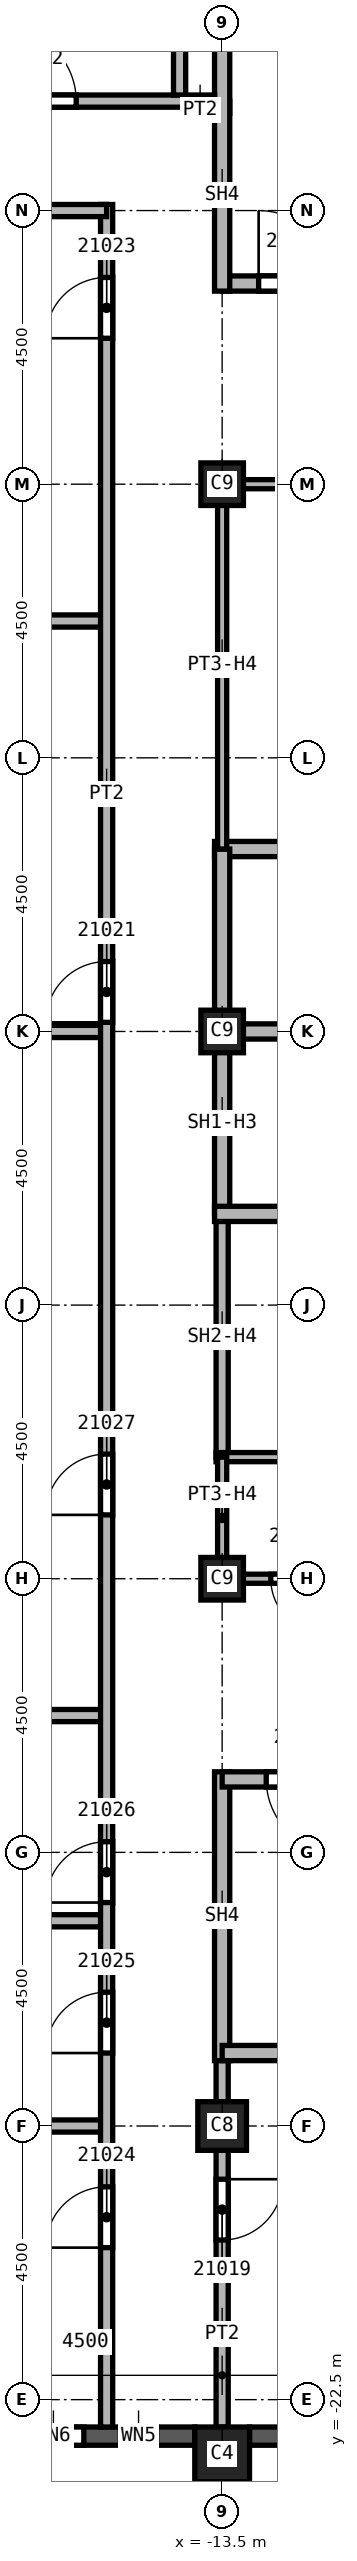
"""IFC4 building model, lengths in metres.
Left out: names, types, materials, properties, quantities, classifications, styles, units other than length and angle.
Written with IfcOpenShell. Run it as: python <this file> out.ifc"""

import sys

from ifc_helpers import new_model, si_unit, direction, frame, frame_2d, origin, origin_2d, place, context, subcontext, project, spatial, rectangle, extrude, element, fill, save


model = new_model("IFC4")
c1 = context("Model", 3, precision=1e-05, world=origin(), true_north=direction((0.0, 1.0)))
c2 = subcontext(c1, "Body", "Model", "MODEL_VIEW")
j1 = project(units=[si_unit("LENGTHUNIT", "METRE"), si_unit("PLANEANGLEUNIT", "RADIAN")], contexts=[c1])
p1 = place(None, origin())
s1 = spatial("IfcSite", under=j1, at=p1, CompositionType="ELEMENT")
p2 = place(p1, origin())
s2 = spatial("IfcBuilding", under=s1, at=p2, CompositionType="ELEMENT")
p3 = place(p2, frame((0.0, 0.0, 304.0)))
s3 = spatial("IfcBuildingStorey", under=s2, at=p3, CompositionType="ELEMENT", Elevation=304.0)
p4 = place(p3, frame((-13.5, -18.0, 0.0), z_axis=(0.0, 0.0, 1.0), x_axis=(1.0, 0.0, 0.0)))
e1 = element("IfcColumn", 1, at=p4, inside=s3, PredefinedType="COLUMN", context=c2, shape_type="SweptSolid", body=[
    extrude(rectangle(XDim=0.8, YDim=0.8, at=origin_2d()), origin(), (0.0, 0.0, 1.0), 3.74),
])
for number, where, z_axis, x_axis in (
    (2, (-13.5, 0.0, 0.0), (0.0, 0.0, 1.0), (1.0, 0.0, 0.0)),
    (3, (-13.5, 9.0, 0.0), (0.0, 0.0, 1.0), (1.0, 0.0, 0.0)),
    (4, (-13.5, -9.0, 0.0), (0.0, 0.0, 1.0), (1.0, 0.0, 0.0)),
):
    element("IfcColumn", number, at=place(p3, frame(where, z_axis=z_axis, x_axis=x_axis)), inside=s3, PredefinedType="COLUMN", context=c2, shape_type="SweptSolid", body=[
        extrude(rectangle(XDim=0.7, YDim=0.7, at=origin_2d()), origin(), (0.0, 0.0, 1.0), 3.74),
    ])
p5 = place(p3, frame((-13.5, -23.4, 0.0), z_axis=(0.0, 0.0, 1.0), x_axis=(1.0, 0.0, 0.0)))
e5 = element("IfcColumn", 5, at=p5, inside=s3, PredefinedType="COLUMN", context=c2, shape_type="SweptSolid", body=[
    extrude(rectangle(XDim=0.9, YDim=0.9, at=origin_2d()), origin(), (0.0, 0.0, 1.0), 3.74),
])
p6 = place(p3, frame((-17.55, -23.1, 0.0), z_axis=(0.0, 0.0, 1.0), x_axis=(1.0, 0.0, 0.0)))
e6 = element("IfcWall", 6, at=p6, inside=s3, PredefinedType="SOLIDWALL", context=c2, shape_type="SweptSolid", body=[
    extrude(rectangle(XDim=3.6, YDim=0.3, at=frame_2d((1.8, 0.0))), origin(), (0.0, 0.0, 1.0), 3.14),
])
p7 = place(p6, frame((0.775, 0.0, 0.8)))
e7 = element("IfcOpeningElement", 7, at=p7, cuts=e6, PredefinedType="OPENING", context=c2, shape_type="SweptSolid", body=[
    extrude(rectangle(XDim=1.0, YDim=1.95, at=frame_2d((0.5, 0.975))), frame((0.0, 0.15, 0.0), z_axis=(0.0, -1.0, 0.0), x_axis=(1.0, 0.0, 0.0)), (0.0, 0.0, 1.0), 0.3),
])
p8 = place(p6, frame((2.375, 0.0, 0.8)))
e8 = element("IfcOpeningElement", 8, at=p8, cuts=e6, PredefinedType="OPENING", context=c2, shape_type="SweptSolid", body=[
    extrude(rectangle(XDim=0.6, YDim=1.95, at=frame_2d((0.3, 0.975))), frame((0.0, 0.15, 0.0), z_axis=(0.0, -1.0, 0.0), x_axis=(1.0, 0.0, 0.0)), (0.0, 0.0, 1.0), 0.3),
])
p9 = place(p3, frame((-13.05, -23.1, 0.0), z_axis=(0.0, 0.0, 1.0), x_axis=(1.0, 0.0, 0.0)))
e9 = element("IfcWall", 9, at=p9, inside=s3, PredefinedType="SOLIDWALL", context=c2, shape_type="SweptSolid", body=[
    extrude(rectangle(XDim=3.6, YDim=0.3, at=frame_2d((1.8, 0.0))), origin(), (0.0, 0.0, 1.0), 3.14),
])
p10 = place(p9, frame((0.6, 0.0, 0.8)))
e10 = element("IfcOpeningElement", 10, at=p10, cuts=e9, PredefinedType="OPENING", context=c2, shape_type="SweptSolid", body=[
    extrude(rectangle(XDim=2.4, YDim=1.95, at=frame_2d((1.2, 0.975))), frame((0.0, 0.15, 0.0), z_axis=(0.0, -1.0, 0.0), x_axis=(1.0, 0.0, 0.0)), (0.0, 0.0, 1.0), 0.3),
])
for number, where, z_axis, x_axis in (
    (11, (-26.55, -14.625, 0.0), (0.0, 0.0, 1.0), (1.0, 0.0, 0.0)),
    (12, (-26.55, -11.25, 0.0), (0.0, 0.0, 1.0), (1.0, 0.0, 0.0)),
    (13, (-26.55, 6.75, 0.0), (0.0, 0.0, 1.0), (1.0, 0.0, 0.0)),
):
    element("IfcWall", number, at=place(p3, frame(where, z_axis=z_axis, x_axis=x_axis)), inside=s3, PredefinedType="PARTITIONING", context=c2, shape_type="SweptSolid", body=[
        extrude(rectangle(XDim=11.15, YDim=0.2, at=frame_2d((5.575, 0.0))), origin(), (0.0, 0.0, 1.0), 3.74),
    ])
p11 = place(p3, frame((-24.3, -18.0, 0.0), z_axis=(0.0, 0.0, 1.0), x_axis=(1.0, 0.0, 0.0)))
e14 = element("IfcWall", 14, at=p11, inside=s3, PredefinedType="PARTITIONING", context=c2, shape_type="SweptSolid", body=[
    extrude(rectangle(XDim=8.9, YDim=0.2, at=frame_2d((4.45, 0.0))), origin(), (0.0, 0.0, 1.0), 3.74),
])
p12 = place(p3, frame((-15.4, 0.0, 0.0), z_axis=(0.0, 0.0, 1.0), x_axis=(-1.0, 0.0, 0.0)))
e15 = element("IfcWall", 15, at=p12, inside=s3, PredefinedType="PARTITIONING", context=c2, shape_type="SweptSolid", body=[
    extrude(rectangle(XDim=11.15, YDim=0.2, at=frame_2d((5.575, 0.0))), origin(), (0.0, 0.0, 1.0), 3.74),
])
p13 = place(p3, frame((-15.4, -22.95, 0.0), z_axis=(0.0, 0.0, 1.0), x_axis=(0.0, 1.0, 0.0)))
e16 = element("IfcWall", 16, at=p13, inside=s3, PredefinedType="PARTITIONING", context=c2, shape_type="SweptSolid", body=[
    extrude(rectangle(XDim=36.55, YDim=0.2, at=frame_2d((18.275, 0.0))), origin(), (0.0, 0.0, 1.0), 3.74),
])
p14 = place(p13, frame((23.1, 0.0, 0.0)))
e17 = element("IfcOpeningElement", 17, at=p14, cuts=e16, PredefinedType="OPENING", context=c2, shape_type="SweptSolid", body=[
    extrude(rectangle(XDim=1.0, YDim=2.1, at=frame_2d((0.5, 1.05))), frame((0.0, 0.1, 0.0), z_axis=(0.0, -1.0, 0.0), x_axis=(1.0, 0.0, 0.0)), (0.0, 0.0, 1.0), 0.2),
])
p15 = place(p13, frame((34.35, 0.0, 0.0)))
e18 = element("IfcOpeningElement", 18, at=p15, cuts=e16, PredefinedType="OPENING", context=c2, shape_type="SweptSolid", body=[
    extrude(rectangle(XDim=1.0, YDim=2.1, at=frame_2d((0.5, 1.05))), frame((0.0, 0.1, 0.0), z_axis=(0.0, -1.0, 0.0), x_axis=(1.0, 0.0, 0.0)), (0.0, 0.0, 1.0), 0.2),
])
p16 = place(p13, frame((2.95, 0.0, 0.0)))
e19 = element("IfcOpeningElement", 19, at=p16, cuts=e16, PredefinedType="OPENING", context=c2, shape_type="SweptSolid", body=[
    extrude(rectangle(XDim=1.0, YDim=2.1, at=frame_2d((0.5, 1.05))), frame((0.0, 0.1, 0.0), z_axis=(0.0, -1.0, 0.0), x_axis=(1.0, 0.0, 0.0)), (0.0, 0.0, 1.0), 0.2),
])
p17 = place(p13, frame((6.15, 0.0, 0.0)))
e20 = element("IfcOpeningElement", 20, at=p17, cuts=e16, PredefinedType="OPENING", context=c2, shape_type="SweptSolid", body=[
    extrude(rectangle(XDim=1.0, YDim=2.1, at=frame_2d((0.5, 1.05))), frame((0.0, 0.1, 0.0), z_axis=(0.0, -1.0, 0.0), x_axis=(1.0, 0.0, 0.0)), (0.0, 0.0, 1.0), 0.2),
])
p18 = place(p13, frame((8.625, 0.0, 0.0)))
e21 = element("IfcOpeningElement", 21, at=p18, cuts=e16, PredefinedType="OPENING", context=c2, shape_type="SweptSolid", body=[
    extrude(rectangle(XDim=1.0, YDim=2.1, at=frame_2d((0.5, 1.05))), frame((0.0, 0.1, 0.0), z_axis=(0.0, -1.0, 0.0), x_axis=(1.0, 0.0, 0.0)), (0.0, 0.0, 1.0), 0.2),
])
p19 = place(p13, frame((15.0, 0.0, 0.0)))
e22 = element("IfcOpeningElement", 22, at=p19, cuts=e16, PredefinedType="OPENING", context=c2, shape_type="SweptSolid", body=[
    extrude(rectangle(XDim=1.0, YDim=2.1, at=frame_2d((0.5, 1.05))), frame((0.0, 0.1, 0.0), z_axis=(0.0, -1.0, 0.0), x_axis=(1.0, 0.0, 0.0)), (0.0, 0.0, 1.0), 0.2),
])
p20 = place(p3, frame((-15.4, 13.5, 0.0), z_axis=(0.0, 0.0, 1.0), x_axis=(-1.0, 0.0, 0.0)))
e23 = element("IfcWall", 23, at=p20, inside=s3, PredefinedType="PARTITIONING", context=c2, shape_type="SweptSolid", body=[
    extrude(rectangle(XDim=6.6, YDim=0.2, at=frame_2d((3.3, 0.0))), origin(), (0.0, 0.0, 1.0), 3.74),
])
p21 = place(p3, frame((-14.1, 15.2, 0.0), z_axis=(0.0, 0.0, 1.0), x_axis=(1.0, 0.0, 0.0)))
e24 = element("IfcWall", 24, at=p21, inside=s3, PredefinedType="PARTITIONING", context=c2, shape_type="SweptSolid", body=[
    extrude(rectangle(XDim=0.725, YDim=0.2, at=frame_2d((0.363, 0.0))), origin(), (0.0, 0.0, 1.0), 3.74),
])
p22 = place(p3, frame((-13.5, -16.675, 0.0), z_axis=(0.0, 0.0, 1.0), x_axis=(0.0, -1.0, 0.0)))
e25 = element("IfcWall", 25, at=p22, inside=s3, PredefinedType="PARTITIONING", context=c2, shape_type="SweptSolid", body=[
    extrude(rectangle(XDim=6.275, YDim=0.2, at=frame_2d((3.137, 0.0))), origin(), (0.0, 0.0, 1.0), 3.74),
])
p23 = place(p22, frame((2.2, 0.0, 0.0)))
e26 = element("IfcOpeningElement", 26, at=p23, cuts=e25, PredefinedType="OPENING", context=c2, shape_type="SweptSolid", body=[
    extrude(rectangle(XDim=1.0, YDim=2.1, at=frame_2d((0.5, 1.05))), frame((0.0, 0.1, 0.0), z_axis=(0.0, -1.0, 0.0), x_axis=(1.0, 0.0, 0.0)), (0.0, 0.0, 1.0), 0.2),
])
p24 = place(p3, frame((-13.5, -7.0, 0.0), z_axis=(0.0, 0.0, 1.0), x_axis=(0.0, 1.0, 0.0)))
e27 = element("IfcWall", 27, at=p24, inside=s3, PredefinedType="SOLIDWALL", context=c2, shape_type="SweptSolid", body=[
    extrude(rectangle(XDim=4.0, YDim=0.2, at=frame_2d((2.0, 0.0))), origin(), (0.0, 0.0, 1.0), 3.062),
])
p25 = place(p3, frame((-13.625, 0.0, 0.0), z_axis=(0.0, 0.0, 1.0), x_axis=(1.0, 0.0, 0.0)))
e28 = element("IfcWall", 28, at=p25, inside=s3, PredefinedType="SOLIDWALL", context=c2, shape_type="SweptSolid", body=[
    extrude(rectangle(XDim=3.125, YDim=0.25, at=frame_2d((1.562, 0.0))), origin(), (0.0, 0.0, 1.0), 3.74),
])
p26 = place(p3, frame((-13.625, 3.0, 0.0), z_axis=(0.0, 0.0, 1.0), x_axis=(1.0, 0.0, 0.0)))
e29 = element("IfcWall", 29, at=p26, inside=s3, PredefinedType="SOLIDWALL", context=c2, shape_type="SweptSolid", body=[
    extrude(rectangle(XDim=6.125, YDim=0.25, at=frame_2d((3.062, 0.0))), origin(), (0.0, 0.0, 1.0), 3.74),
])
p27 = place(p26, frame((4.0, 0.0, 0.0)))
e30 = element("IfcOpeningElement", 30, at=p27, cuts=e29, PredefinedType="OPENING", context=c2, shape_type="SweptSolid", body=[
    extrude(rectangle(XDim=1.1, YDim=2.1, at=frame_2d((0.55, 1.05))), frame((0.0, 0.125, 0.0), z_axis=(0.0, -1.0, 0.0), x_axis=(1.0, 0.0, 0.0)), (0.0, 0.0, 1.0), 0.25),
])
p28 = place(p3, frame((-13.5, -3.0, 0.0), z_axis=(0.0, 0.0, 1.0), x_axis=(0.0, 1.0, 0.0)))
e31 = element("IfcWall", 31, at=p28, inside=s3, PredefinedType="SOLIDWALL", context=c2, shape_type="SweptSolid", body=[
    extrude(rectangle(XDim=6.0, YDim=0.25, at=frame_2d((3.0, 0.0))), origin(), (0.0, 0.0, 1.0), 3.062),
])
p29 = place(p3, frame((-13.625, -3.0, 0.0), z_axis=(0.0, 0.0, 1.0), x_axis=(1.0, 0.0, 0.0)))
e32 = element("IfcWall", 32, at=p29, inside=s3, PredefinedType="SOLIDWALL", context=c2, shape_type="SweptSolid", body=[
    extrude(rectangle(XDim=6.125, YDim=0.25, at=frame_2d((3.062, 0.0))), origin(), (0.0, 0.0, 1.0), 3.74),
])
p30 = place(p29, frame((4.0, 0.0, 0.0)))
e33 = element("IfcOpeningElement", 33, at=p30, cuts=e32, PredefinedType="OPENING", context=c2, shape_type="SweptSolid", body=[
    extrude(rectangle(XDim=1.1, YDim=2.1, at=frame_2d((0.55, 1.05))), frame((0.0, 0.125, 0.0), z_axis=(0.0, -1.0, 0.0), x_axis=(1.0, 0.0, 0.0)), (0.0, 0.0, 1.0), 0.25),
])
p31 = place(p3, frame((-13.5, -12.175, 0.0), z_axis=(0.0, 0.0, 1.0), x_axis=(0.0, -1.0, 0.0)))
e34 = element("IfcWall", 34, at=p31, inside=s3, PredefinedType="SOLIDWALL", context=c2, shape_type="SweptSolid", body=[
    extrude(rectangle(XDim=4.75, YDim=0.25, at=frame_2d((2.375, 0.0))), origin(), (0.0, 0.0, 1.0), 3.74),
])
p32 = place(p3, frame((-13.5, 12.3, 0.0), z_axis=(0.0, 0.0, 1.0), x_axis=(1.0, 0.0, 0.0)))
e35 = element("IfcWall", 35, at=p32, inside=s3, PredefinedType="SOLIDWALL", context=c2, shape_type="SweptSolid", body=[
    extrude(rectangle(XDim=9.125, YDim=0.25, at=frame_2d((4.562, 0.0))), origin(), (0.0, 0.0, 1.0), 3.74),
])
p33 = place(p32, frame((0.6, 0.0, 0.0)))
e36 = element("IfcOpeningElement", 36, at=p33, cuts=e35, PredefinedType="OPENING", context=c2, shape_type="SweptSolid", body=[
    extrude(rectangle(XDim=1.2, YDim=2.1, at=frame_2d((0.6, 1.05))), frame((0.0, 0.125, 0.0), z_axis=(0.0, -1.0, 0.0), x_axis=(1.0, 0.0, 0.0)), (0.0, 0.0, 1.0), 0.25),
])
p34 = place(p3, frame((-13.5, 12.175, 0.0), z_axis=(0.0, 0.0, 1.0), x_axis=(0.0, 1.0, 0.0)))
e37 = element("IfcWall", 37, at=p34, inside=s3, PredefinedType="SOLIDWALL", context=c2, shape_type="SweptSolid", body=[
    extrude(rectangle(XDim=4.75, YDim=0.25, at=frame_2d((2.375, 0.0))), origin(), (0.0, 0.0, 1.0), 3.74),
])
p35 = place(p3, frame((-4.5, -16.8, 0.0), z_axis=(0.0, 0.0, 1.0), x_axis=(-1.0, 0.0, 0.0)))
e38 = element("IfcWall", 38, at=p35, inside=s3, PredefinedType="SOLIDWALL", context=c2, shape_type="SweptSolid", body=[
    extrude(rectangle(XDim=9.0, YDim=0.25, at=frame_2d((4.5, 0.0))), origin(), (0.0, 0.0, 1.0), 3.74),
])
p36 = place(p3, frame((-4.375, -12.3, 0.0), z_axis=(0.0, 0.0, 1.0), x_axis=(-1.0, 0.0, 0.0)))
e39 = element("IfcWall", 39, at=p36, inside=s3, PredefinedType="SOLIDWALL", context=c2, shape_type="SweptSolid", body=[
    extrude(rectangle(XDim=9.125, YDim=0.25, at=frame_2d((4.562, 0.0))), origin(), (0.0, 0.0, 1.0), 3.74),
])
p37 = place(p36, frame((7.2, 0.0, 0.0)))
e40 = element("IfcOpeningElement", 40, at=p37, cuts=e39, PredefinedType="OPENING", context=c2, shape_type="SweptSolid", body=[
    extrude(rectangle(XDim=1.2, YDim=2.1, at=frame_2d((0.6, 1.05))), frame((0.0, 0.125, 0.0), z_axis=(0.0, -1.0, 0.0), x_axis=(1.0, 0.0, 0.0)), (0.0, 0.0, 1.0), 0.25),
])
p38 = place(p3, frame((-13.6, -7.0, 0.0), z_axis=(0.0, 0.0, 1.0), x_axis=(1.0, 0.0, 0.0)))
e41 = element("IfcWall", 41, at=p38, inside=s3, PredefinedType="PARTITIONING", context=c2, shape_type="SweptSolid", body=[
    extrude(rectangle(XDim=3.1, YDim=0.15, at=frame_2d((1.55, 0.0))), origin(), (0.0, 0.0, 1.0), 3.74),
])
p39 = place(p3, frame((-13.5, -9.075, 0.0), z_axis=(0.0, 0.0, 1.0), x_axis=(0.0, 1.0, 0.0)))
e42 = element("IfcWall", 42, at=p39, inside=s3, PredefinedType="PARTITIONING", context=c2, shape_type="SweptSolid", body=[
    extrude(rectangle(XDim=2.075, YDim=0.15, at=frame_2d((1.038, 0.0))), origin(), (0.0, 0.0, 1.0), 3.062),
])
p40 = place(p3, frame((-13.5, 3.0, 0.0), z_axis=(0.0, 0.0, 1.0), x_axis=(0.0, 1.0, 0.0)))
e43 = element("IfcWall", 43, at=p40, inside=s3, PredefinedType="PARTITIONING", context=c2, shape_type="SweptSolid", body=[
    extrude(rectangle(XDim=6.075, YDim=0.15, at=frame_2d((3.038, 0.0))), origin(), (0.0, 0.0, 1.0), 3.062),
])
p41 = place(p3, frame((-13.5, 9.0, 0.0), z_axis=(0.0, 0.0, 1.0), x_axis=(1.0, 0.0, 0.0)))
e44 = element("IfcWall", 44, at=p41, inside=s3, PredefinedType="PARTITIONING", context=c2, shape_type="SweptSolid", body=[
    extrude(rectangle(XDim=3.0, YDim=0.15, at=frame_2d((1.5, 0.0))), origin(), (0.0, 0.0, 1.0), 3.062),
])
p42 = place(p3, frame((-10.5, -9.0, 0.0), z_axis=(0.0, 0.0, 1.0), x_axis=(-1.0, 0.0, 0.0)))
e45 = element("IfcWall", 45, at=p42, inside=s3, PredefinedType="PARTITIONING", context=c2, shape_type="SweptSolid", body=[
    extrude(rectangle(XDim=3.0, YDim=0.15, at=frame_2d((1.5, 0.0))), origin(), (0.0, 0.0, 1.0), 3.062),
])
p43 = place(p42, frame((1.3, 0.0, 0.0)))
e46 = element("IfcOpeningElement", 46, at=p43, cuts=e45, PredefinedType="OPENING", context=c2, shape_type="SweptSolid", body=[
    extrude(rectangle(XDim=0.9, YDim=2.1, at=frame_2d((0.45, 1.05))), frame((0.0, 0.075, 0.0), z_axis=(0.0, -1.0, 0.0), x_axis=(1.0, 0.0, 0.0)), (0.0, 0.0, 1.0), 0.15),
])
p44 = place(p3, frame((-21.9, 15.3, 0.0), z_axis=(0.0, 0.0, 1.0), x_axis=(1.0, 0.0, 0.0)))
e47 = element("IfcWall", 47, at=p44, inside=s3, PredefinedType="SOLIDWALL", context=c2, shape_type="SweptSolid", body=[
    extrude(rectangle(XDim=8.275, YDim=0.2, at=frame_2d((4.137, 0.0))), origin(), (0.0, 0.0, 1.0), 3.74),
])
p45 = place(p44, frame((4.8, 0.0, 0.0)))
e48 = element("IfcOpeningElement", 48, at=p45, cuts=e47, PredefinedType="OPENING", context=c2, shape_type="SweptSolid", body=[
    extrude(rectangle(XDim=1.2, YDim=2.1, at=frame_2d((0.6, 1.05))), frame((0.0, 0.1, 0.0), z_axis=(0.0, -1.0, 0.0), x_axis=(1.0, 0.0, 0.0)), (0.0, 0.0, 1.0), 0.2),
])
p46 = place(p3, frame((-14.2, 15.4, 0.0), z_axis=(0.0, 0.0, 1.0), x_axis=(0.0, 1.0, 0.0)))
e49 = element("IfcWall", 49, at=p46, inside=s3, PredefinedType="SOLIDWALL", context=c2, shape_type="SweptSolid", body=[
    extrude(rectangle(XDim=5.9, YDim=0.2, at=frame_2d((2.95, 0.0))), origin(), (0.0, 0.0, 1.0), 3.74),
])
p47 = place(p43, origin())
e50 = element("IfcDoor", 50, at=p47, inside=s3, OperationType="SINGLE_SWING_RIGHT", PredefinedType="DOOR", context=c2, shape_type="SweptSolid", body=[
    extrude(rectangle(XDim=0.9, YDim=2.1, at=frame_2d((0.45, 1.05))), frame((0.0, 0.025, 0.0), z_axis=(0.0, -1.0, 0.0), x_axis=(1.0, 0.0, 0.0)), (0.0, 0.0, 1.0), 0.05),
])
fill(e46, e50)
p48 = place(p33, origin())
e51 = element("IfcDoor", 51, at=p48, inside=s3, OperationType="SINGLE_SWING_LEFT", PredefinedType="DOOR", context=c2, shape_type="SweptSolid", body=[
    extrude(rectangle(XDim=1.2, YDim=2.1, at=frame_2d((0.6, 1.05))), frame((0.0, 0.025, 0.0), z_axis=(0.0, -1.0, 0.0), x_axis=(1.0, 0.0, 0.0)), (0.0, 0.0, 1.0), 0.05),
])
fill(e36, e51)
p49 = place(p37, origin())
e52 = element("IfcDoor", 52, at=p49, inside=s3, OperationType="SINGLE_SWING_RIGHT", PredefinedType="DOOR", context=c2, shape_type="SweptSolid", body=[
    extrude(rectangle(XDim=1.2, YDim=2.1, at=frame_2d((0.6, 1.05))), frame((0.0, 0.025, 0.0), z_axis=(0.0, -1.0, 0.0), x_axis=(1.0, 0.0, 0.0)), (0.0, 0.0, 1.0), 0.05),
])
fill(e40, e52)
p50 = place(p23, origin())
e53 = element("IfcDoor", 53, at=p50, inside=s3, OperationType="SINGLE_SWING_RIGHT", PredefinedType="DOOR", context=c2, shape_type="SweptSolid", body=[
    extrude(rectangle(XDim=1.0, YDim=2.1, at=frame_2d((0.5, 1.05))), frame((0.0, 0.025, 0.0), z_axis=(0.0, -1.0, 0.0), x_axis=(1.0, 0.0, 0.0)), (0.0, 0.0, 1.0), 0.05),
])
fill(e26, e53)
p51 = place(p14, origin())
e54 = element("IfcDoor", 54, at=p51, inside=s3, OperationType="SINGLE_SWING_RIGHT", PredefinedType="DOOR", context=c2, shape_type="SweptSolid", body=[
    extrude(rectangle(XDim=1.0, YDim=2.1, at=frame_2d((0.5, 1.05))), frame((0.0, 0.025, 0.0), z_axis=(0.0, -1.0, 0.0), x_axis=(1.0, 0.0, 0.0)), (0.0, 0.0, 1.0), 0.05),
])
fill(e17, e54)
p52 = place(p15, origin())
e55 = element("IfcDoor", 55, at=p52, inside=s3, OperationType="SINGLE_SWING_RIGHT", PredefinedType="DOOR", context=c2, shape_type="SweptSolid", body=[
    extrude(rectangle(XDim=1.0, YDim=2.1, at=frame_2d((0.5, 1.05))), frame((0.0, 0.025, 0.0), z_axis=(0.0, -1.0, 0.0), x_axis=(1.0, 0.0, 0.0)), (0.0, 0.0, 1.0), 0.05),
])
fill(e18, e55)
p53 = place(p16, origin())
e56 = element("IfcDoor", 56, at=p53, inside=s3, OperationType="SINGLE_SWING_LEFT", PredefinedType="DOOR", context=c2, shape_type="SweptSolid", body=[
    extrude(rectangle(XDim=1.0, YDim=2.1, at=frame_2d((0.5, 1.05))), frame((0.0, 0.025, 0.0), z_axis=(0.0, -1.0, 0.0), x_axis=(1.0, 0.0, 0.0)), (0.0, 0.0, 1.0), 0.05),
])
fill(e19, e56)
p54 = place(p17, origin())
e57 = element("IfcDoor", 57, at=p54, inside=s3, OperationType="SINGLE_SWING_RIGHT", PredefinedType="DOOR", context=c2, shape_type="SweptSolid", body=[
    extrude(rectangle(XDim=1.0, YDim=2.1, at=frame_2d((0.5, 1.05))), frame((0.0, 0.025, 0.0), z_axis=(0.0, -1.0, 0.0), x_axis=(1.0, 0.0, 0.0)), (0.0, 0.0, 1.0), 0.05),
])
fill(e20, e57)
p55 = place(p18, origin())
e58 = element("IfcDoor", 58, at=p55, inside=s3, OperationType="SINGLE_SWING_LEFT", PredefinedType="DOOR", context=c2, shape_type="SweptSolid", body=[
    extrude(rectangle(XDim=1.0, YDim=2.1, at=frame_2d((0.5, 1.05))), frame((0.0, 0.025, 0.0), z_axis=(0.0, -1.0, 0.0), x_axis=(1.0, 0.0, 0.0)), (0.0, 0.0, 1.0), 0.05),
])
fill(e21, e58)
p56 = place(p19, origin())
e59 = element("IfcDoor", 59, at=p56, inside=s3, OperationType="SINGLE_SWING_RIGHT", PredefinedType="DOOR", context=c2, shape_type="SweptSolid", body=[
    extrude(rectangle(XDim=1.0, YDim=2.1, at=frame_2d((0.5, 1.05))), frame((0.0, 0.025, 0.0), z_axis=(0.0, -1.0, 0.0), x_axis=(1.0, 0.0, 0.0)), (0.0, 0.0, 1.0), 0.05),
])
fill(e22, e59)
p57 = place(p45, origin())
e60 = element("IfcDoor", 60, at=p57, inside=s3, OperationType="SINGLE_SWING_RIGHT", PredefinedType="DOOR", context=c2, shape_type="SweptSolid", body=[
    extrude(rectangle(XDim=1.2, YDim=2.1, at=frame_2d((0.6, 1.05))), frame((0.0, 0.025, 0.0), z_axis=(0.0, -1.0, 0.0), x_axis=(1.0, 0.0, 0.0)), (0.0, 0.0, 1.0), 0.05),
])
fill(e48, e60)
p58 = place(p7, origin())
e61 = element("IfcWindow", 61, at=p58, inside=s3, PartitioningType="SINGLE_PANEL", PredefinedType="WINDOW", context=c2, shape_type="SweptSolid", body=[
    extrude(rectangle(XDim=1.0, YDim=1.95, at=frame_2d((0.5, 0.975))), frame((0.0, 0.03, 0.0), z_axis=(0.0, -1.0, 0.0), x_axis=(1.0, 0.0, 0.0)), (0.0, 0.0, 1.0), 0.06),
])
fill(e7, e61)
p59 = place(p8, origin())
e62 = element("IfcWindow", 62, at=p59, inside=s3, PartitioningType="SINGLE_PANEL", PredefinedType="WINDOW", context=c2, shape_type="SweptSolid", body=[
    extrude(rectangle(XDim=0.6, YDim=1.95, at=frame_2d((0.3, 0.975))), frame((0.0, 0.03, 0.0), z_axis=(0.0, -1.0, 0.0), x_axis=(1.0, 0.0, 0.0)), (0.0, 0.0, 1.0), 0.06),
])
fill(e8, e62)
save(model, sys.argv[1])
